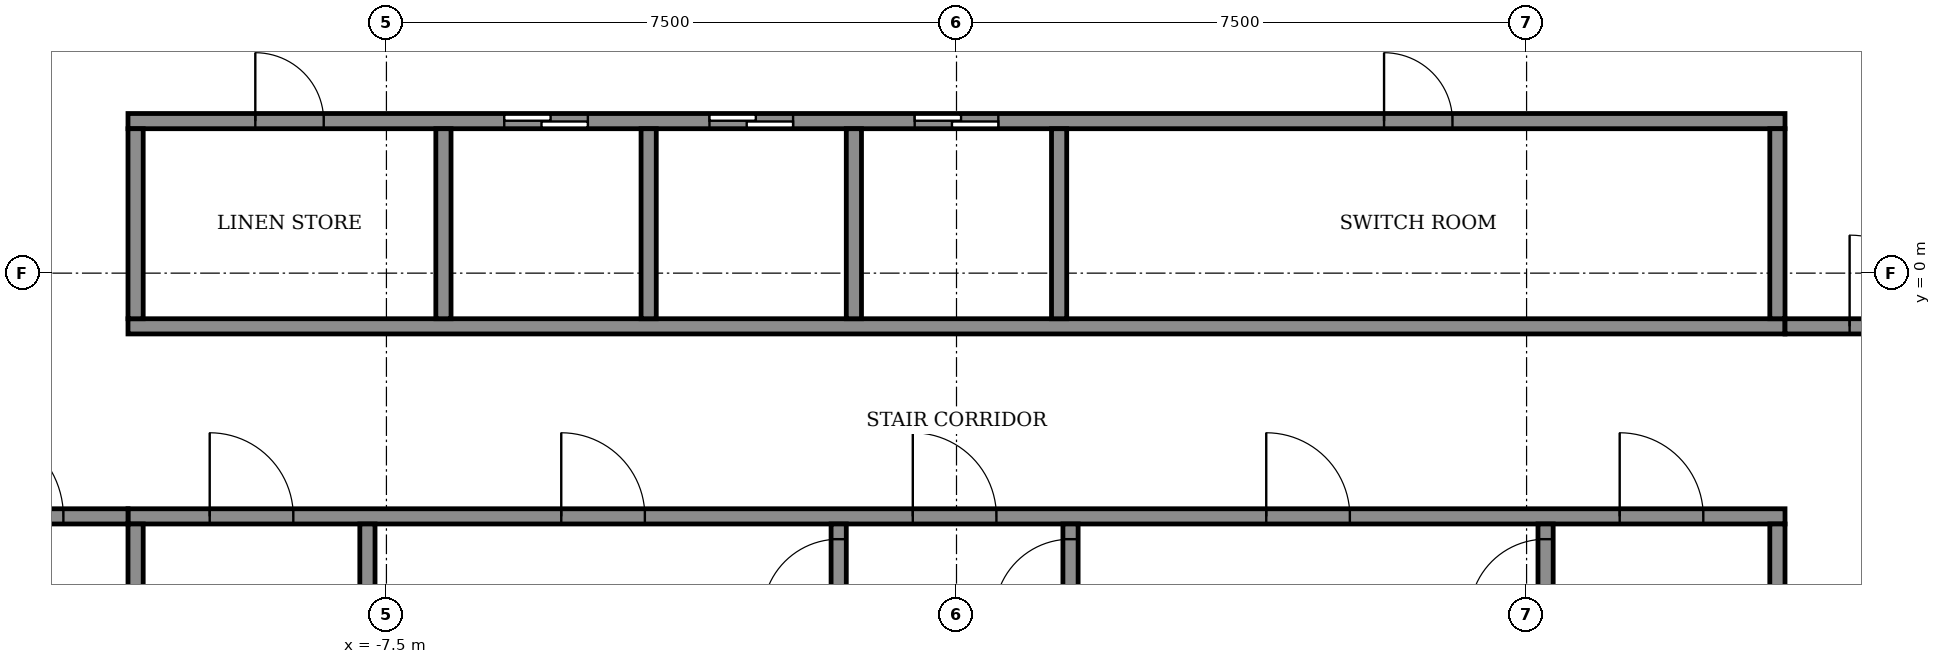
"""IFC4 building model, lengths in metres.
Left out: names, types, materials, properties, quantities, classifications, styles, units other than length and angle.
Written with IfcOpenShell. Run it as: python <this file> out.ifc"""

import sys

from ifc_helpers import new_model, si_unit, direction, frame, frame_2d, origin, place, context, subcontext, project, spatial, rectangle, extrude, element, fill, save


model = new_model("IFC4")
c1 = context("Model", 3, precision=1e-05, world=origin(), true_north=direction((0.0, 1.0)))
c2 = subcontext(c1, "Body", "Model", "MODEL_VIEW")
j1 = project(units=[si_unit("LENGTHUNIT", "METRE"), si_unit("PLANEANGLEUNIT", "RADIAN")], contexts=[c1])
p1 = place(None, origin())
s1 = spatial("IfcSite", under=j1, at=p1, CompositionType="ELEMENT")
p2 = place(p1, origin())
s2 = spatial("IfcBuilding", under=s1, at=p2, CompositionType="ELEMENT")
p3 = place(p2, frame((0.0, 0.0, 252.7)))
s3 = spatial("IfcBuildingStorey", under=s2, at=p3, CompositionType="ELEMENT", Elevation=252.7)
p4 = place(p3, frame((-10.9, -3.2, 0.0), z_axis=(0.0, 0.0, 1.0), x_axis=(1.0, 0.0, 0.0)))
e1 = element("IfcWall", 1, at=p4, inside=s3, PredefinedType="SHEAR", context=c2, shape_type="SweptSolid", body=[
    extrude(rectangle(XDim=21.8, YDim=0.2, at=frame_2d((10.9, 0.0))), origin(), (0.0, 0.0, 1.0), 4.05),
])
p5 = place(p4, frame((1.075, 0.0, 0.0)))
e2 = element("IfcOpeningElement", 2, at=p5, cuts=e1, PredefinedType="OPENING", context=c2, shape_type="SweptSolid", body=[
    extrude(rectangle(XDim=1.1, YDim=2.1, at=frame_2d((0.55, 1.05))), frame((0.0, 0.11, 0.0), z_axis=(0.0, -1.0, 0.0), x_axis=(1.0, 0.0, 0.0)), (0.0, 0.0, 1.0), 0.22),
])
p6 = place(p4, frame((10.325, 0.0, 0.0)))
e3 = element("IfcOpeningElement", 3, at=p6, cuts=e1, PredefinedType="OPENING", context=c2, shape_type="SweptSolid", body=[
    extrude(rectangle(XDim=1.1, YDim=2.1, at=frame_2d((0.55, 1.05))), frame((0.0, 0.11, 0.0), z_axis=(0.0, -1.0, 0.0), x_axis=(1.0, 0.0, 0.0)), (0.0, 0.0, 1.0), 0.22),
])
p7 = place(p4, frame((19.625, 0.0, 0.0)))
e4 = element("IfcOpeningElement", 4, at=p7, cuts=e1, PredefinedType="OPENING", context=c2, shape_type="SweptSolid", body=[
    extrude(rectangle(XDim=1.1, YDim=2.1, at=frame_2d((0.55, 1.05))), frame((0.0, 0.11, 0.0), z_axis=(0.0, -1.0, 0.0), x_axis=(1.0, 0.0, 0.0)), (0.0, 0.0, 1.0), 0.22),
])
p8 = place(p4, frame((5.7, 0.0, 0.0)))
e5 = element("IfcOpeningElement", 5, at=p8, cuts=e1, PredefinedType="OPENING", context=c2, shape_type="SweptSolid", body=[
    extrude(rectangle(XDim=1.1, YDim=2.1, at=frame_2d((0.55, 1.05))), frame((0.0, 0.11, 0.0), z_axis=(0.0, -1.0, 0.0), x_axis=(1.0, 0.0, 0.0)), (0.0, 0.0, 1.0), 0.22),
])
p9 = place(p4, frame((14.975, 0.0, 0.0)))
e6 = element("IfcOpeningElement", 6, at=p9, cuts=e1, PredefinedType="OPENING", context=c2, shape_type="SweptSolid", body=[
    extrude(rectangle(XDim=1.1, YDim=2.1, at=frame_2d((0.55, 1.05))), frame((0.0, 0.11, 0.0), z_axis=(0.0, -1.0, 0.0), x_axis=(1.0, 0.0, 0.0)), (0.0, 0.0, 1.0), 0.22),
])
p10 = place(p3, frame((-10.9, -0.7, 0.0), z_axis=(0.0, 0.0, 1.0), x_axis=(1.0, 0.0, 0.0)))
e7 = element("IfcWall", 7, at=p10, inside=s3, PredefinedType="SHEAR", context=c2, shape_type="SweptSolid", body=[
    extrude(rectangle(XDim=21.8, YDim=0.2, at=frame_2d((10.9, 0.0))), origin(), (0.0, 0.0, 1.0), 4.05),
])
p11 = place(p3, frame((-10.9, 2.0, 0.0), z_axis=(0.0, 0.0, 1.0), x_axis=(1.0, 0.0, 0.0)))
e8 = element("IfcWall", 8, at=p11, inside=s3, PredefinedType="SHEAR", context=c2, shape_type="SweptSolid", body=[
    extrude(rectangle(XDim=21.8, YDim=0.2, at=frame_2d((10.9, 0.0))), origin(), (0.0, 0.0, 1.0), 4.05),
])
p12 = place(p11, frame((4.95, 0.0, 0.0)))
e9 = element("IfcOpeningElement", 9, at=p12, cuts=e8, PredefinedType="OPENING", context=c2, shape_type="SweptSolid", body=[
    extrude(rectangle(XDim=1.1, YDim=2.1, at=frame_2d((0.55, 1.05))), frame((0.0, 0.11, 0.0), z_axis=(0.0, -1.0, 0.0), x_axis=(1.0, 0.0, 0.0)), (0.0, 0.0, 1.0), 0.22),
])
p13 = place(p11, frame((7.65, 0.0, 0.0)))
e10 = element("IfcOpeningElement", 10, at=p13, cuts=e8, PredefinedType="OPENING", context=c2, shape_type="SweptSolid", body=[
    extrude(rectangle(XDim=1.1, YDim=2.1, at=frame_2d((0.55, 1.05))), frame((0.0, 0.11, 0.0), z_axis=(0.0, -1.0, 0.0), x_axis=(1.0, 0.0, 0.0)), (0.0, 0.0, 1.0), 0.22),
])
p14 = place(p11, frame((10.35, 0.0, 0.0)))
e11 = element("IfcOpeningElement", 11, at=p14, cuts=e8, PredefinedType="OPENING", context=c2, shape_type="SweptSolid", body=[
    extrude(rectangle(XDim=1.1, YDim=2.1, at=frame_2d((0.55, 1.05))), frame((0.0, 0.11, 0.0), z_axis=(0.0, -1.0, 0.0), x_axis=(1.0, 0.0, 0.0)), (0.0, 0.0, 1.0), 0.22),
])
p15 = place(p11, frame((1.675, 0.0, 0.0)))
e12 = element("IfcOpeningElement", 12, at=p15, cuts=e8, PredefinedType="OPENING", context=c2, shape_type="SweptSolid", body=[
    extrude(rectangle(XDim=0.9, YDim=2.1, at=frame_2d((0.45, 1.05))), frame((0.0, 0.11, 0.0), z_axis=(0.0, -1.0, 0.0), x_axis=(1.0, 0.0, 0.0)), (0.0, 0.0, 1.0), 0.22),
])
p16 = place(p11, frame((16.525, 0.0, 0.0)))
e13 = element("IfcOpeningElement", 13, at=p16, cuts=e8, PredefinedType="OPENING", context=c2, shape_type="SweptSolid", body=[
    extrude(rectangle(XDim=0.9, YDim=2.1, at=frame_2d((0.45, 1.05))), frame((0.0, 0.11, 0.0), z_axis=(0.0, -1.0, 0.0), x_axis=(1.0, 0.0, 0.0)), (0.0, 0.0, 1.0), 0.22),
])
for number, where, z_axis, x_axis in (
    (14, (-10.8, -10.8, 0.0), (0.0, 0.0, 1.0), (0.0, 1.0, 0.0)),
    (15, (-7.75, -10.8, 0.0), (0.0, 0.0, 1.0), (0.0, 1.0, 0.0)),
):
    element("IfcWall", number, at=place(p3, frame(where, z_axis=z_axis, x_axis=x_axis)), inside=s3, PredefinedType="SHEAR", context=c2, shape_type="SweptSolid", body=[
        extrude(rectangle(XDim=7.5, YDim=0.2, at=frame_2d((3.75, 0.0))), origin(), (0.0, 0.0, 1.0), 4.05),
    ])
p17 = place(p3, frame((-1.55, -10.8, 0.0), z_axis=(0.0, 0.0, 1.0), x_axis=(0.0, 1.0, 0.0)))
e16 = element("IfcWall", 16, at=p17, inside=s3, PredefinedType="SHEAR", context=c2, shape_type="SweptSolid", body=[
    extrude(rectangle(XDim=7.5, YDim=0.2, at=frame_2d((3.75, 0.0))), origin(), (0.0, 0.0, 1.0), 4.05),
])
p18 = place(p17, frame((6.3, 0.0, 0.0)))
e17 = element("IfcOpeningElement", 17, at=p18, cuts=e16, PredefinedType="OPENING", context=c2, shape_type="SweptSolid", body=[
    extrude(rectangle(XDim=1.0, YDim=2.1, at=frame_2d((0.5, 1.05))), frame((0.0, 0.11, 0.0), z_axis=(0.0, -1.0, 0.0), x_axis=(1.0, 0.0, 0.0)), (0.0, 0.0, 1.0), 0.22),
])
p19 = place(p3, frame((1.5, -10.8, 0.0), z_axis=(0.0, 0.0, 1.0), x_axis=(0.0, 1.0, 0.0)))
e18 = element("IfcWall", 18, at=p19, inside=s3, PredefinedType="SHEAR", context=c2, shape_type="SweptSolid", body=[
    extrude(rectangle(XDim=7.5, YDim=0.2, at=frame_2d((3.75, 0.0))), origin(), (0.0, 0.0, 1.0), 4.05),
])
p20 = place(p19, frame((6.3, 0.0, 0.0)))
e19 = element("IfcOpeningElement", 19, at=p20, cuts=e18, PredefinedType="OPENING", context=c2, shape_type="SweptSolid", body=[
    extrude(rectangle(XDim=1.0, YDim=2.1, at=frame_2d((0.5, 1.05))), frame((0.0, 0.11, 0.0), z_axis=(0.0, -1.0, 0.0), x_axis=(1.0, 0.0, 0.0)), (0.0, 0.0, 1.0), 0.22),
])
p21 = place(p3, frame((7.75, -10.8, 0.0), z_axis=(0.0, 0.0, 1.0), x_axis=(0.0, 1.0, 0.0)))
e20 = element("IfcWall", 20, at=p21, inside=s3, PredefinedType="SHEAR", context=c2, shape_type="SweptSolid", body=[
    extrude(rectangle(XDim=7.5, YDim=0.2, at=frame_2d((3.75, 0.0))), origin(), (0.0, 0.0, 1.0), 4.05),
])
p22 = place(p21, frame((6.3, 0.0, 0.0)))
e21 = element("IfcOpeningElement", 21, at=p22, cuts=e20, PredefinedType="OPENING", context=c2, shape_type="SweptSolid", body=[
    extrude(rectangle(XDim=1.0, YDim=2.1, at=frame_2d((0.5, 1.05))), frame((0.0, 0.11, 0.0), z_axis=(0.0, -1.0, 0.0), x_axis=(1.0, 0.0, 0.0)), (0.0, 0.0, 1.0), 0.22),
])
p23 = place(p3, frame((10.8, -10.8, 0.0), z_axis=(0.0, 0.0, 1.0), x_axis=(0.0, 1.0, 0.0)))
e22 = element("IfcWall", 22, at=p23, inside=s3, PredefinedType="SHEAR", context=c2, shape_type="SweptSolid", body=[
    extrude(rectangle(XDim=7.5, YDim=0.2, at=frame_2d((3.75, 0.0))), origin(), (0.0, 0.0, 1.0), 4.05),
])
p24 = place(p3, frame((-10.8, -0.6, 0.0), z_axis=(0.0, 0.0, 1.0), x_axis=(0.0, 1.0, 0.0)))
e23 = element("IfcWall", 23, at=p24, inside=s3, PredefinedType="STANDARD", context=c2, shape_type="SweptSolid", body=[
    extrude(rectangle(XDim=2.5, YDim=0.2, at=frame_2d((1.25, 0.0))), origin(), (0.0, 0.0, 1.0), 4.05),
])
for number, where, z_axis, x_axis in (
    (24, (-6.75, -0.6, 0.0), (0.0, 0.0, 1.0), (0.0, 1.0, 0.0)),
    (25, (-4.05, -0.6, 0.0), (0.0, 0.0, 1.0), (0.0, 1.0, 0.0)),
    (26, (-1.35, -0.6, 0.0), (0.0, 0.0, 1.0), (0.0, 1.0, 0.0)),
    (27, (1.35, -0.6, 0.0), (0.0, 0.0, 1.0), (0.0, 1.0, 0.0)),
):
    element("IfcWall", number, at=place(p3, frame(where, z_axis=z_axis, x_axis=x_axis)), inside=s3, PredefinedType="SHEAR", context=c2, shape_type="SweptSolid", body=[
        extrude(rectangle(XDim=2.5, YDim=0.2, at=frame_2d((1.25, 0.0))), origin(), (0.0, 0.0, 1.0), 4.05),
    ])
p25 = place(p3, frame((10.8, -0.6, 0.0), z_axis=(0.0, 0.0, 1.0), x_axis=(0.0, 1.0, 0.0)))
e28 = element("IfcWall", 28, at=p25, inside=s3, PredefinedType="STANDARD", context=c2, shape_type="SweptSolid", body=[
    extrude(rectangle(XDim=2.5, YDim=0.2, at=frame_2d((1.25, 0.0))), origin(), (0.0, 0.0, 1.0), 4.05),
])
p26 = place(p3, frame((-13.8, -3.2, 0.0), z_axis=(0.0, 0.0, 1.0), x_axis=(1.0, 0.0, 0.0)))
e29 = element("IfcWall", 29, at=p26, inside=s3, PredefinedType="STANDARD", context=c2, shape_type="SweptSolid", body=[
    extrude(rectangle(XDim=2.9, YDim=0.2, at=frame_2d((1.45, 0.0))), origin(), (0.0, 0.0, 1.0), 4.05),
])
p27 = place(p26, frame((0.85, 0.0, 0.0)))
e30 = element("IfcOpeningElement", 30, at=p27, cuts=e29, PredefinedType="OPENING", context=c2, shape_type="SweptSolid", body=[
    extrude(rectangle(XDim=1.2, YDim=2.1, at=frame_2d((0.6, 1.05))), frame((0.0, 0.11, 0.0), z_axis=(0.0, -1.0, 0.0), x_axis=(1.0, 0.0, 0.0)), (0.0, 0.0, 1.0), 0.22),
])
p28 = place(p3, frame((10.9, -0.7, 0.0), z_axis=(0.0, 0.0, 1.0), x_axis=(1.0, 0.0, 0.0)))
e31 = element("IfcWall", 31, at=p28, inside=s3, PredefinedType="STANDARD", context=c2, shape_type="SweptSolid", body=[
    extrude(rectangle(XDim=2.9, YDim=0.2, at=frame_2d((1.45, 0.0))), origin(), (0.0, 0.0, 1.0), 4.05),
])
p29 = place(p28, frame((0.85, 0.0, 0.0)))
e32 = element("IfcOpeningElement", 32, at=p29, cuts=e31, PredefinedType="OPENING", context=c2, shape_type="SweptSolid", body=[
    extrude(rectangle(XDim=1.2, YDim=2.1, at=frame_2d((0.6, 1.05))), frame((0.0, 0.11, 0.0), z_axis=(0.0, -1.0, 0.0), x_axis=(1.0, 0.0, 0.0)), (0.0, 0.0, 1.0), 0.22),
])
p30 = place(p12, origin())
e33 = element("IfcDoor", 33, at=p30, inside=s3, OperationType="SLIDING_TO_LEFT", PredefinedType="DOOR", context=c2, shape_type="SweptSolid", body=[
    extrude(rectangle(XDim=1.1, YDim=2.1, at=frame_2d((0.55, 1.05))), frame((0.0, 0.025, 0.0), z_axis=(0.0, -1.0, 0.0), x_axis=(1.0, 0.0, 0.0)), (0.0, 0.0, 1.0), 0.05),
])
fill(e9, e33)
p31 = place(p13, origin())
e34 = element("IfcDoor", 34, at=p31, inside=s3, OperationType="SLIDING_TO_LEFT", PredefinedType="DOOR", context=c2, shape_type="SweptSolid", body=[
    extrude(rectangle(XDim=1.1, YDim=2.1, at=frame_2d((0.55, 1.05))), frame((0.0, 0.025, 0.0), z_axis=(0.0, -1.0, 0.0), x_axis=(1.0, 0.0, 0.0)), (0.0, 0.0, 1.0), 0.05),
])
fill(e10, e34)
p32 = place(p14, origin())
e35 = element("IfcDoor", 35, at=p32, inside=s3, OperationType="SLIDING_TO_LEFT", PredefinedType="DOOR", context=c2, shape_type="SweptSolid", body=[
    extrude(rectangle(XDim=1.1, YDim=2.1, at=frame_2d((0.55, 1.05))), frame((0.0, 0.025, 0.0), z_axis=(0.0, -1.0, 0.0), x_axis=(1.0, 0.0, 0.0)), (0.0, 0.0, 1.0), 0.05),
])
fill(e11, e35)
p33 = place(p15, origin())
e36 = element("IfcDoor", 36, at=p33, inside=s3, OperationType="SINGLE_SWING_RIGHT", PredefinedType="DOOR", context=c2, shape_type="SweptSolid", body=[
    extrude(rectangle(XDim=0.9, YDim=2.1, at=frame_2d((0.45, 1.05))), frame((0.0, 0.025, 0.0), z_axis=(0.0, -1.0, 0.0), x_axis=(1.0, 0.0, 0.0)), (0.0, 0.0, 1.0), 0.05),
])
fill(e12, e36)
p34 = place(p16, origin())
e37 = element("IfcDoor", 37, at=p34, inside=s3, OperationType="SINGLE_SWING_LEFT", PredefinedType="DOOR", context=c2, shape_type="SweptSolid", body=[
    extrude(rectangle(XDim=0.9, YDim=2.1, at=frame_2d((0.45, 1.05))), frame((0.0, 0.025, 0.0), z_axis=(0.0, -1.0, 0.0), x_axis=(1.0, 0.0, 0.0)), (0.0, 0.0, 1.0), 0.05),
])
fill(e13, e37)
p35 = place(p5, origin())
e38 = element("IfcDoor", 38, at=p35, inside=s3, OperationType="SINGLE_SWING_RIGHT", PredefinedType="DOOR", context=c2, shape_type="SweptSolid", body=[
    extrude(rectangle(XDim=1.1, YDim=2.1, at=frame_2d((0.55, 1.05))), frame((0.0, 0.025, 0.0), z_axis=(0.0, -1.0, 0.0), x_axis=(1.0, 0.0, 0.0)), (0.0, 0.0, 1.0), 0.05),
])
fill(e2, e38)
p36 = place(p6, origin())
e39 = element("IfcDoor", 39, at=p36, inside=s3, OperationType="SINGLE_SWING_RIGHT", PredefinedType="DOOR", context=c2, shape_type="SweptSolid", body=[
    extrude(rectangle(XDim=1.1, YDim=2.1, at=frame_2d((0.55, 1.05))), frame((0.0, 0.025, 0.0), z_axis=(0.0, -1.0, 0.0), x_axis=(1.0, 0.0, 0.0)), (0.0, 0.0, 1.0), 0.05),
])
fill(e3, e39)
p37 = place(p7, origin())
e40 = element("IfcDoor", 40, at=p37, inside=s3, OperationType="SINGLE_SWING_RIGHT", PredefinedType="DOOR", context=c2, shape_type="SweptSolid", body=[
    extrude(rectangle(XDim=1.1, YDim=2.1, at=frame_2d((0.55, 1.05))), frame((0.0, 0.025, 0.0), z_axis=(0.0, -1.0, 0.0), x_axis=(1.0, 0.0, 0.0)), (0.0, 0.0, 1.0), 0.05),
])
fill(e4, e40)
p38 = place(p8, origin())
e41 = element("IfcDoor", 41, at=p38, inside=s3, OperationType="SINGLE_SWING_LEFT", PredefinedType="DOOR", context=c2, shape_type="SweptSolid", body=[
    extrude(rectangle(XDim=1.1, YDim=2.1, at=frame_2d((0.55, 1.05))), frame((0.0, 0.025, 0.0), z_axis=(0.0, -1.0, 0.0), x_axis=(1.0, 0.0, 0.0)), (0.0, 0.0, 1.0), 0.05),
])
fill(e5, e41)
p39 = place(p9, origin())
e42 = element("IfcDoor", 42, at=p39, inside=s3, OperationType="SINGLE_SWING_LEFT", PredefinedType="DOOR", context=c2, shape_type="SweptSolid", body=[
    extrude(rectangle(XDim=1.1, YDim=2.1, at=frame_2d((0.55, 1.05))), frame((0.0, 0.025, 0.0), z_axis=(0.0, -1.0, 0.0), x_axis=(1.0, 0.0, 0.0)), (0.0, 0.0, 1.0), 0.05),
])
fill(e6, e42)
p40 = place(p18, origin())
e43 = element("IfcDoor", 43, at=p40, inside=s3, OperationType="SINGLE_SWING_RIGHT", PredefinedType="DOOR", context=c2, shape_type="SweptSolid", body=[
    extrude(rectangle(XDim=1.0, YDim=2.1, at=frame_2d((0.5, 1.05))), frame((0.0, 0.025, 0.0), z_axis=(0.0, -1.0, 0.0), x_axis=(1.0, 0.0, 0.0)), (0.0, 0.0, 1.0), 0.05),
])
fill(e17, e43)
p41 = place(p20, origin())
e44 = element("IfcDoor", 44, at=p41, inside=s3, OperationType="SINGLE_SWING_RIGHT", PredefinedType="DOOR", context=c2, shape_type="SweptSolid", body=[
    extrude(rectangle(XDim=1.0, YDim=2.1, at=frame_2d((0.5, 1.05))), frame((0.0, 0.025, 0.0), z_axis=(0.0, -1.0, 0.0), x_axis=(1.0, 0.0, 0.0)), (0.0, 0.0, 1.0), 0.05),
])
fill(e19, e44)
p42 = place(p22, origin())
e45 = element("IfcDoor", 45, at=p42, inside=s3, OperationType="SINGLE_SWING_RIGHT", PredefinedType="DOOR", context=c2, shape_type="SweptSolid", body=[
    extrude(rectangle(XDim=1.0, YDim=2.1, at=frame_2d((0.5, 1.05))), frame((0.0, 0.025, 0.0), z_axis=(0.0, -1.0, 0.0), x_axis=(1.0, 0.0, 0.0)), (0.0, 0.0, 1.0), 0.05),
])
fill(e21, e45)
p43 = place(p27, origin())
e46 = element("IfcDoor", 46, at=p43, inside=s3, OperationType="SINGLE_SWING_LEFT", PredefinedType="DOOR", context=c2, shape_type="SweptSolid", body=[
    extrude(rectangle(XDim=1.2, YDim=2.1, at=frame_2d((0.6, 1.05))), frame((0.0, 0.025, 0.0), z_axis=(0.0, -1.0, 0.0), x_axis=(1.0, 0.0, 0.0)), (0.0, 0.0, 1.0), 0.05),
])
fill(e30, e46)
p44 = place(p29, origin())
e47 = element("IfcDoor", 47, at=p44, inside=s3, OperationType="SINGLE_SWING_LEFT", PredefinedType="DOOR", context=c2, shape_type="SweptSolid", body=[
    extrude(rectangle(XDim=1.2, YDim=2.1, at=frame_2d((0.6, 1.05))), frame((0.0, 0.025, 0.0), z_axis=(0.0, -1.0, 0.0), x_axis=(1.0, 0.0, 0.0)), (0.0, 0.0, 1.0), 0.05),
])
fill(e32, e47)
save(model, sys.argv[1])
